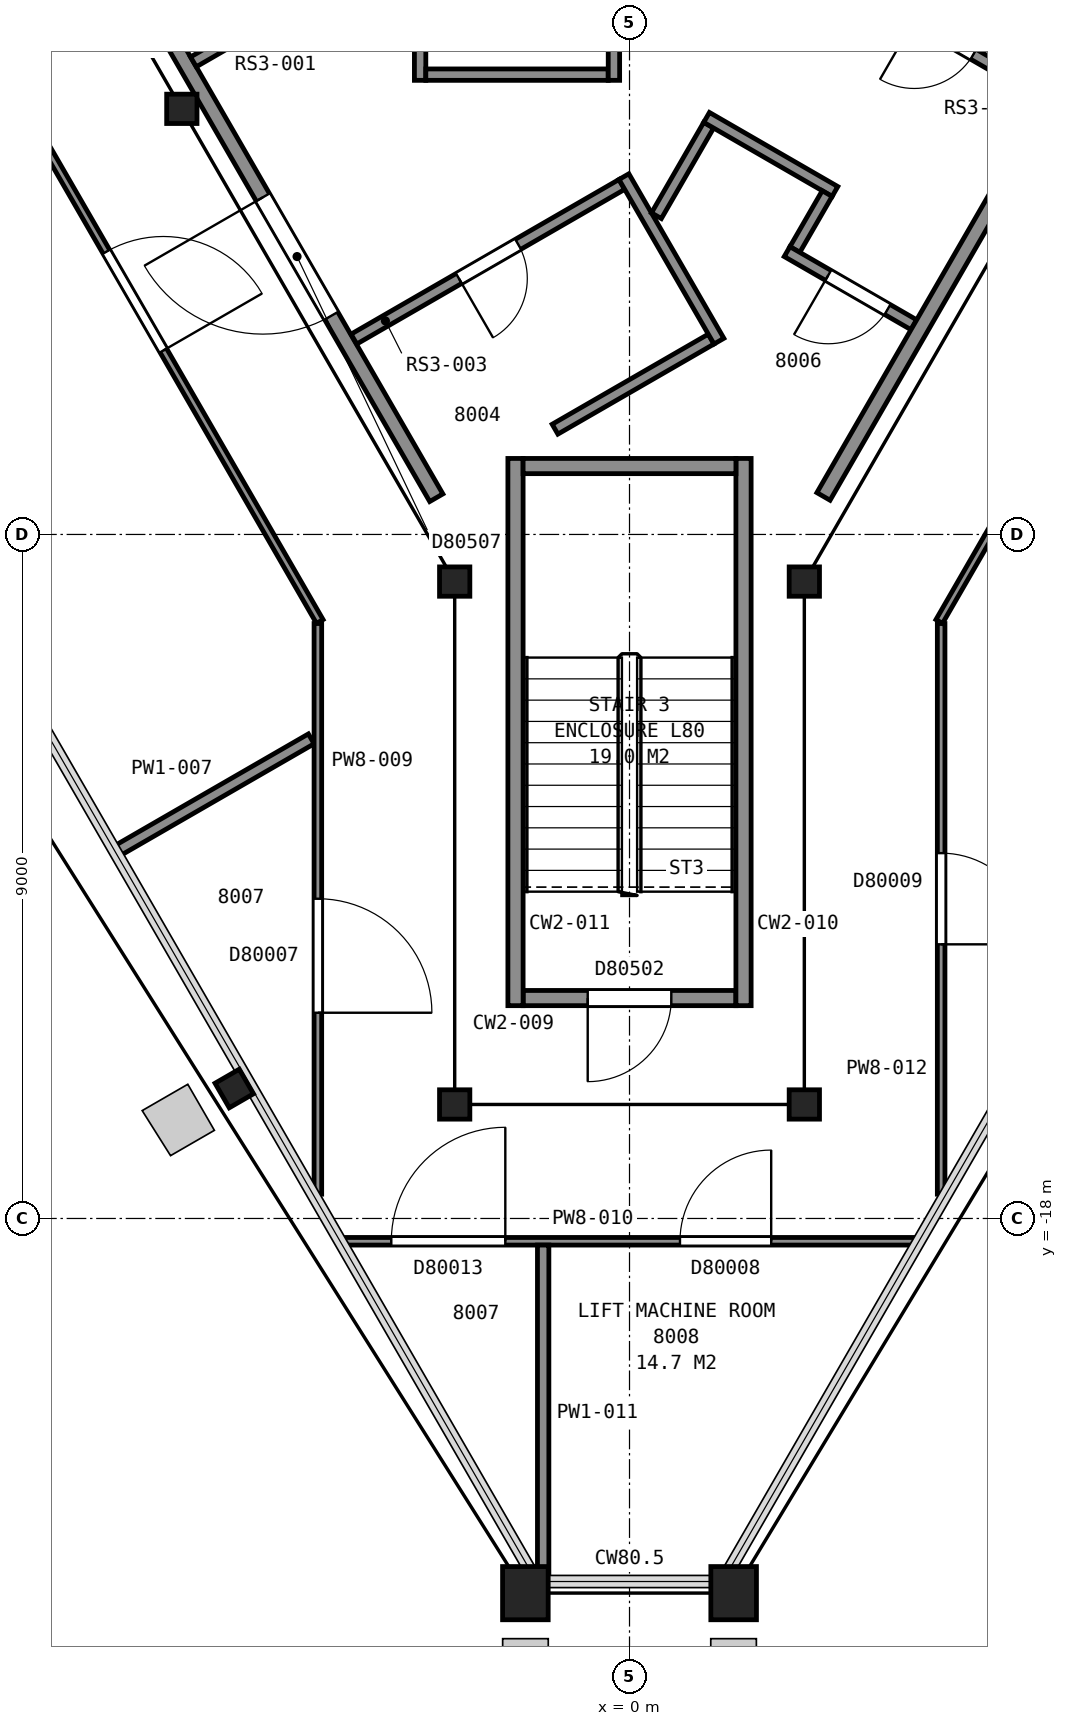
"""IFC4 building model, lengths in metres.
Left out: names, types, materials, properties, quantities, classifications, styles, units other than length and angle.
Written with IfcOpenShell. Run it as: python <this file> out.ifc"""

import sys

from ifc_helpers import new_model, si_unit, direction, frame, frame_2d, origin, origin_2d, place, context, subcontext, project, spatial, rectangle, hollow_rectangle, i_section, extrude, element, fill, save


model = new_model("IFC4")
c1 = context("Model", 3, precision=1e-05, world=origin(), true_north=direction((0.0, 1.0)))
c2 = subcontext(c1, "Body", "Model", "MODEL_VIEW")
j1 = project(units=[si_unit("LENGTHUNIT", "METRE"), si_unit("PLANEANGLEUNIT", "RADIAN")], contexts=[c1])
p1 = place(None, origin())
s1 = spatial("IfcSite", under=j1, at=p1, CompositionType="ELEMENT")
p2 = place(p1, origin())
s2 = spatial("IfcBuilding", under=s1, at=p2, CompositionType="ELEMENT")
p3 = place(p2, frame((0.0, 0.0, 316.8)))
s3 = spatial("IfcBuildingStorey", under=s2, at=p3, CompositionType="ELEMENT", Elevation=316.8)
p4 = place(p3, frame((-5.2, -16.29, 0.0), z_axis=(0.0, 0.0, 1.0), x_axis=(-0.5, 0.866025403784, 0.0)))
e1 = element("IfcColumn", 1, at=p4, inside=s3, PredefinedType="COLUMN", context=c2, shape_type="SweptSolid", body=[
    extrude(i_section(OverallWidth=0.373, OverallDepth=0.368, WebThickness=0.015, FlangeThickness=0.024, FilletRadius=0.015, at=origin_2d()), origin(), (0.0, 0.0, 1.0), 4.2),
])
for number, where, z_axis, x_axis in (
    (2, (-1.37, -22.93, 0.0), (0.0, 0.0, 1.0), (-1.0, 0.0, 0.0)),
    (3, (1.37, -22.93, 0.0), (0.0, 0.0, 1.0), (-1.0, 0.0, 0.0)),
):
    element("IfcColumn", number, at=place(p3, frame(where, z_axis=z_axis, x_axis=x_axis)), inside=s3, PredefinedType="COLUMN", context=c2, shape_type="SweptSolid", body=[
        extrude(hollow_rectangle(XDim=0.6, YDim=0.7, WallThickness=0.04, at=origin_2d()), origin(), (0.0, 0.0, 1.0), 4.2),
    ])
for number, where, z_axis, x_axis in (
    (4, (-5.89, -3.4, 0.0), (0.0, 0.0, 1.0), (1.0, 0.0, 0.0)),
    (5, (-2.3, -9.62, 0.0), (0.0, 0.0, 1.0), (1.0, 0.0, 0.0)),
    (6, (-2.3, -16.5, 0.0), (0.0, 0.0, 1.0), (-1.0, 0.0, 0.0)),
    (7, (2.3, -16.5, 0.0), (0.0, 0.0, 1.0), (-1.0, 0.0, 0.0)),
    (8, (2.3, -9.62, 0.0), (0.0, 0.0, 1.0), (1.0, 0.0, 0.0)),
):
    element("IfcColumn", number, at=place(p3, frame(where, z_axis=z_axis, x_axis=x_axis)), inside=s3, PredefinedType="COLUMN", context=c2, shape_type="SweptSolid", body=[
        extrude(i_section(OverallWidth=0.399, OverallDepth=0.386, WebThickness=0.021, FlangeThickness=0.033, FilletRadius=0.015, at=origin_2d()), origin(), (0.0, 0.0, 1.0), 4.2),
    ])
p5 = place(p3, frame((-1.4, -15.1, 0.0), z_axis=(0.0, 0.0, 1.0), x_axis=(1.0, 0.0, 0.0)))
e9 = element("IfcWall", 9, at=p5, inside=s3, PredefinedType="PARTITIONING", context=c2, shape_type="SweptSolid", body=[
    extrude(rectangle(XDim=2.8, YDim=0.2, at=frame_2d((1.4, 0.0))), origin(), (0.0, 0.0, 1.0), 3.95),
])
p6 = place(p5, frame((0.85, 0.0, 0.0)))
e10 = element("IfcOpeningElement", 10, at=p6, cuts=e9, PredefinedType="OPENING", context=c2, shape_type="SweptSolid", body=[
    extrude(rectangle(XDim=1.1, YDim=2.1, at=frame_2d((0.55, 1.05))), frame((0.0, 0.11, 0.0), z_axis=(0.0, -1.0, 0.0), x_axis=(1.0, 0.0, 0.0)), (0.0, 0.0, 1.0), 0.22),
])
for number, where, z_axis, x_axis in (
    (11, (1.5, -8.0, 0.0), (0.0, 0.0, 1.0), (0.0, -1.0, 0.0)),
    (12, (-1.5, -8.0, 0.0), (0.0, 0.0, 1.0), (0.0, -1.0, 0.0)),
):
    element("IfcWall", number, at=place(p3, frame(where, z_axis=z_axis, x_axis=x_axis)), inside=s3, PredefinedType="PARTITIONING", context=c2, shape_type="SweptSolid", body=[
        extrude(rectangle(XDim=7.2, YDim=0.2, at=frame_2d((3.6, 0.0))), origin(), (0.0, 0.0, 1.0), 3.95),
    ])
p7 = place(p3, frame((-1.4, -8.1, 0.0), z_axis=(0.0, 0.0, 1.0), x_axis=(1.0, 0.0, 0.0)))
e13 = element("IfcWall", 13, at=p7, inside=s3, PredefinedType="PARTITIONING", context=c2, shape_type="SweptSolid", body=[
    extrude(rectangle(XDim=2.8, YDim=0.2, at=frame_2d((1.4, 0.0))), origin(), (0.0, 0.0, 1.0), 3.95),
])
p8 = place(p3, frame((-7.141, -0.551, 0.0), z_axis=(0.0, 0.0, 1.0), x_axis=(0.499992795234, -0.866029563418, 0.0)))
e14 = element("IfcWall", 14, at=p8, inside=s3, PredefinedType="PARTITIONING", context=c2, shape_type="SweptSolid", body=[
    extrude(rectangle(XDim=9.198, YDim=0.2, at=frame_2d((4.599, 0.0))), origin(), (0.0, 0.0, 1.0), 3.95),
])
p9 = place(p8, frame((4.634, 0.0, 0.0)))
e15 = element("IfcOpeningElement", 15, at=p9, cuts=e14, PredefinedType="OPENING", context=c2, shape_type="SweptSolid", body=[
    extrude(rectangle(XDim=1.8, YDim=2.1, at=frame_2d((0.9, 1.05))), frame((0.0, 0.11, 0.0), z_axis=(0.0, -1.0, 0.0), x_axis=(1.0, 0.0, 0.0)), (0.0, 0.0, 1.0), 0.22),
])
p10 = place(p3, frame((-5.737, -2.782, 0.0), z_axis=(0.0, 0.0, 1.0), x_axis=(0.866000843773, 0.500042536776, 0.0)))
e16 = element("IfcWall", 16, at=p10, inside=s3, PredefinedType="PARTITIONING", context=c2, shape_type="SweptSolid", body=[
    extrude(rectangle(XDim=2.025, YDim=0.15, at=frame_2d((1.012, 0.0))), origin(), (0.0, 0.0, 1.0), 3.95),
])
p11 = place(p3, frame((-0.101, -4.395, 0.0), z_axis=(0.0, 0.0, 1.0), x_axis=(-0.866045745349, -0.499964765721, 0.0)))
e17 = element("IfcWall", 17, at=p11, inside=s3, PredefinedType="PARTITIONING", context=c2, shape_type="SweptSolid", body=[
    extrude(rectangle(XDim=4.07, YDim=0.15, at=frame_2d((2.035, 0.0))), origin(), (0.0, 0.0, 1.0), 3.95),
])
p12 = place(p11, frame((1.575, 0.0, 0.0)))
e18 = element("IfcOpeningElement", 18, at=p12, cuts=e17, PredefinedType="OPENING", context=c2, shape_type="SweptSolid", body=[
    extrude(rectangle(XDim=0.9, YDim=2.1, at=frame_2d((0.45, 1.05))), frame((0.0, 0.085, 0.0), z_axis=(0.0, -1.0, 0.0), x_axis=(1.0, 0.0, 0.0)), (0.0, 0.0, 1.0), 0.17),
])
p13 = place(p3, frame((-2.755, -0.102, 0.0), z_axis=(0.0, 0.0, 1.0), x_axis=(0.0, -1.0, 0.0)))
e19 = element("IfcWall", 19, at=p13, inside=s3, PredefinedType="PARTITIONING", context=c2, shape_type="SweptSolid", body=[
    extrude(rectangle(XDim=2.923, YDim=0.15, at=frame_2d((1.461, 0.0))), origin(), (0.0, 0.0, 1.0), 3.95),
])
p14 = place(p13, frame((0.998, 0.0, 0.0)))
e20 = element("IfcOpeningElement", 20, at=p14, cuts=e19, PredefinedType="OPENING", context=c2, shape_type="SweptSolid", body=[
    extrude(rectangle(XDim=0.9, YDim=2.1, at=frame_2d((0.45, 1.05))), frame((0.0, 0.085, 0.0), z_axis=(0.0, -1.0, 0.0), x_axis=(1.0, 0.0, 0.0)), (0.0, 0.0, 1.0), 0.17),
])
p15 = place(p3, frame((-2.68, -2.95, 0.0), z_axis=(0.0, 0.0, 1.0), x_axis=(1.0, 0.0, 0.0)))
e21 = element("IfcWall", 21, at=p15, inside=s3, PredefinedType="PARTITIONING", context=c2, shape_type="SweptSolid", body=[
    extrude(rectangle(XDim=2.4, YDim=0.15, at=frame_2d((1.2, 0.0))), origin(), (0.0, 0.0, 1.0), 3.95),
])
p16 = place(p3, frame((-0.98, -7.615, 0.0), z_axis=(0.0, 0.0, 1.0), x_axis=(0.866081021932, 0.499903654166, 0.0)))
e22 = element("IfcWall", 22, at=p16, inside=s3, PredefinedType="PARTITIONING", context=c2, shape_type="SweptSolid", body=[
    extrude(rectangle(XDim=2.372, YDim=0.15, at=frame_2d((1.186, 0.0))), origin(), (0.0, 0.0, 1.0), 3.95),
])
p17 = place(p3, frame((-0.205, -3.025, 0.0), z_axis=(0.0, 0.0, 1.0), x_axis=(0.0, 1.0, 0.0)))
e23 = element("IfcWall", 23, at=p17, inside=s3, PredefinedType="PARTITIONING", context=c2, shape_type="SweptSolid", body=[
    extrude(rectangle(XDim=2.923, YDim=0.15, at=frame_2d((1.461, 0.0))), origin(), (0.0, 0.0, 1.0), 3.95),
])
p18 = place(p3, frame((-0.073, -4.292, 0.0), z_axis=(0.0, 0.0, 1.0), x_axis=(0.500004234368, -0.866022959057, 0.0)))
e24 = element("IfcWall", 24, at=p18, inside=s3, PredefinedType="PARTITIONING", context=c2, shape_type="SweptSolid", body=[
    extrude(rectangle(XDim=2.5, YDim=0.15, at=frame_2d((1.25, 0.0))), origin(), (0.0, 0.0, 1.0), 3.95),
])
p19 = place(p3, frame((0.354, -4.806, 0.0), z_axis=(0.0, 0.0, 1.0), x_axis=(0.499804398801, 0.866138304741, 0.0)))
e25 = element("IfcWall", 25, at=p19, inside=s3, PredefinedType="PARTITIONING", context=c2, shape_type="SweptSolid", body=[
    extrude(rectangle(XDim=1.375, YDim=0.15, at=frame_2d((0.688, 0.0))), origin(), (0.0, 0.0, 1.0), 3.95),
])
p20 = place(p3, frame((1.014, -3.512, 0.0), z_axis=(0.0, 0.0, 1.0), x_axis=(0.866000020948, -0.500043961785, 0.0)))
e26 = element("IfcWall", 26, at=p20, inside=s3, PredefinedType="PARTITIONING", context=c2, shape_type="SweptSolid", body=[
    extrude(rectangle(XDim=1.95, YDim=0.15, at=frame_2d((0.975, 0.0))), origin(), (0.0, 0.0, 1.0), 3.95),
])
p21 = place(p3, frame((2.176, -5.251, 0.0), z_axis=(0.0, 0.0, 1.0), x_axis=(0.500062241894, 0.865989465428, 0.0)))
e27 = element("IfcWall", 27, at=p21, inside=s3, PredefinedType="PARTITIONING", context=c2, shape_type="SweptSolid", body=[
    extrude(rectangle(XDim=0.85, YDim=0.15, at=frame_2d((0.425, 0.0))), origin(), (0.0, 0.0, 1.0), 3.95),
])
p22 = place(p3, frame((3.74, -6.241, 0.0), z_axis=(0.0, 0.0, 1.0), x_axis=(-0.86609690551, 0.499876134923, 0.0)))
e28 = element("IfcWall", 28, at=p22, inside=s3, PredefinedType="PARTITIONING", context=c2, shape_type="SweptSolid", body=[
    extrude(rectangle(XDim=1.925, YDim=0.15, at=frame_2d((0.963, 0.0))), origin(), (0.0, 0.0, 1.0), 3.95),
])
p23 = place(p22, frame((0.4, 0.0, 0.0)))
e29 = element("IfcOpeningElement", 29, at=p23, cuts=e28, PredefinedType="OPENING", context=c2, shape_type="SweptSolid", body=[
    extrude(rectangle(XDim=0.9, YDim=2.1, at=frame_2d((0.45, 1.05))), frame((0.0, 0.085, 0.0), z_axis=(0.0, -1.0, 0.0), x_axis=(1.0, 0.0, 0.0)), (0.0, 0.0, 1.0), 0.17),
])
p24 = place(p3, frame((2.552, -8.5, 0.0), z_axis=(0.0, 0.0, 1.0), x_axis=(0.499981156672, 0.866036282712, 0.0)))
e30 = element("IfcWall", 30, at=p24, inside=s3, PredefinedType="PARTITIONING", context=c2, shape_type="SweptSolid", body=[
    extrude(rectangle(XDim=13.915, YDim=0.2, at=frame_2d((6.957, 0.0))), origin(), (0.0, 0.0, 1.0), 3.95),
])
p25 = place(p3, frame((3.551, -2.119, 0.0), z_axis=(0.0, 0.0, 1.0), x_axis=(0.865944298464, -0.500140452231, 0.0)))
e31 = element("IfcWall", 31, at=p25, inside=s3, PredefinedType="PARTITIONING", context=c2, shape_type="SweptSolid", body=[
    extrude(rectangle(XDim=2.224, YDim=0.15, at=frame_2d((1.112, 0.0))), origin(), (0.0, 0.0, 1.0), 3.95),
])
p26 = place(p25, frame((0.225, 0.0, 0.0)))
e32 = element("IfcOpeningElement", 32, at=p26, cuts=e31, PredefinedType="OPENING", context=c2, shape_type="SweptSolid", body=[
    extrude(rectangle(XDim=0.9, YDim=2.1, at=frame_2d((0.45, 1.05))), frame((0.0, 0.085, 0.0), z_axis=(0.0, -1.0, 0.0), x_axis=(1.0, 0.0, 0.0)), (0.0, 0.0, 1.0), 0.17),
])
p27 = place(p3, frame((-4.075, -10.145, 0.0), z_axis=(0.0, 0.0, 1.0), x_axis=(-0.499912942625, 0.866075660549, 0.0)))
e33 = element("IfcWall", 33, at=p27, inside=s3, PredefinedType="PARTITIONING", context=c2, shape_type="SweptSolid", body=[
    extrude(rectangle(XDim=13.499, YDim=0.1, at=frame_2d((6.749, 0.0))), origin(), (0.0, 0.0, 1.0), 3.297),
])
p28 = place(p27, frame((4.117, 0.0, 0.0)))
e34 = element("IfcOpeningElement", 34, at=p28, cuts=e33, PredefinedType="OPENING", context=c2, shape_type="SweptSolid", body=[
    extrude(rectangle(XDim=1.5, YDim=2.1, at=frame_2d((0.75, 1.05))), frame((0.0, 0.06, 0.0), z_axis=(0.0, -1.0, 0.0), x_axis=(1.0, 0.0, 0.0)), (0.0, 0.0, 1.0), 0.12),
])
p29 = place(p3, frame((-6.753, -13.17, 0.0), z_axis=(0.0, 0.0, 1.0), x_axis=(0.866125201583, 0.499827105291, 0.0)))
e35 = element("IfcWall", 35, at=p29, inside=s3, PredefinedType="PARTITIONING", context=c2, shape_type="SweptSolid", body=[
    extrude(rectangle(XDim=2.962, YDim=0.15, at=frame_2d((1.481, 0.0))), origin(), (0.0, 0.0, 1.0), 3.297),
])
p30 = place(p3, frame((-4.1, -17.68, 0.0), z_axis=(0.0, 0.0, 1.0), x_axis=(0.0, 1.0, 0.0)))
e36 = element("IfcWall", 36, at=p30, inside=s3, PredefinedType="PARTITIONING", context=c2, shape_type="SweptSolid", body=[
    extrude(rectangle(XDim=7.508, YDim=0.1, at=frame_2d((3.754, 0.0))), origin(), (0.0, 0.0, 1.0), 3.297),
])
p31 = place(p30, frame((2.387, 0.0, 0.0)))
e37 = element("IfcOpeningElement", 37, at=p31, cuts=e36, PredefinedType="OPENING", context=c2, shape_type="SweptSolid", body=[
    extrude(rectangle(XDim=1.5, YDim=2.1, at=frame_2d((0.75, 1.05))), frame((0.0, 0.06, 0.0), z_axis=(0.0, -1.0, 0.0), x_axis=(1.0, 0.0, 0.0)), (0.0, 0.0, 1.0), 0.12),
])
p32 = place(p3, frame((3.763, -18.3, 0.0), z_axis=(0.0, 0.0, 1.0), x_axis=(-1.0, 0.0, 0.0)))
e38 = element("IfcWall", 38, at=p32, inside=s3, PredefinedType="PARTITIONING", context=c2, shape_type="SweptSolid", body=[
    extrude(rectangle(XDim=7.526, YDim=0.1, at=frame_2d((3.763, 0.0))), origin(), (0.0, 0.0, 1.0), 3.297),
])
p33 = place(p32, frame((1.899, 0.0, 0.0)))
e39 = element("IfcOpeningElement", 39, at=p33, cuts=e38, PredefinedType="OPENING", context=c2, shape_type="SweptSolid", body=[
    extrude(rectangle(XDim=1.2, YDim=2.1, at=frame_2d((0.6, 1.05))), frame((0.0, 0.06, 0.0), z_axis=(0.0, -1.0, 0.0), x_axis=(1.0, 0.0, 0.0)), (0.0, 0.0, 1.0), 0.12),
])
p34 = place(p32, frame((5.397, 0.0, 0.0)))
e40 = element("IfcOpeningElement", 40, at=p34, cuts=e38, PredefinedType="OPENING", context=c2, shape_type="SweptSolid", body=[
    extrude(rectangle(XDim=1.5, YDim=2.1, at=frame_2d((0.75, 1.05))), frame((0.0, 0.06, 0.0), z_axis=(0.0, -1.0, 0.0), x_axis=(1.0, 0.0, 0.0)), (0.0, 0.0, 1.0), 0.12),
])
p35 = place(p3, frame((-1.136, -22.764, 0.0), z_axis=(0.0, 0.0, 1.0), x_axis=(0.0, 1.0, 0.0)))
e41 = element("IfcWall", 41, at=p35, inside=s3, PredefinedType="PARTITIONING", context=c2, shape_type="SweptSolid", body=[
    extrude(rectangle(XDim=4.414, YDim=0.15, at=frame_2d((2.207, 0.0))), origin(), (0.0, 0.0, 1.0), 3.297),
])
p36 = place(p3, frame((4.1, -10.172, 0.0), z_axis=(0.0, 0.0, 1.0), x_axis=(0.0, -1.0, 0.0)))
e42 = element("IfcWall", 42, at=p36, inside=s3, PredefinedType="PARTITIONING", context=c2, shape_type="SweptSolid", body=[
    extrude(rectangle(XDim=7.508, YDim=0.1, at=frame_2d((3.754, 0.0))), origin(), (0.0, 0.0, 1.0), 3.297),
])
p37 = place(p36, frame((3.021, 0.0, 0.0)))
e43 = element("IfcOpeningElement", 43, at=p37, cuts=e42, PredefinedType="OPENING", context=c2, shape_type="SweptSolid", body=[
    extrude(rectangle(XDim=1.2, YDim=2.1, at=frame_2d((0.6, 1.05))), frame((0.0, 0.06, 0.0), z_axis=(0.0, -1.0, 0.0), x_axis=(1.0, 0.0, 0.0)), (0.0, 0.0, 1.0), 0.12),
])
p38 = place(p3, frame((4.075, -10.145, 0.0), z_axis=(0.0, 0.0, 1.0), x_axis=(0.499912942625, 0.866075660549, 0.0)))
e44 = element("IfcWall", 44, at=p38, inside=s3, PredefinedType="PARTITIONING", context=c2, shape_type="SweptSolid", body=[
    extrude(rectangle(XDim=13.499, YDim=0.1, at=frame_2d((6.749, 0.0))), origin(), (0.0, 0.0, 1.0), 3.297),
])
p39 = place(p6, origin())
e45 = element("IfcDoor", 45, at=p39, inside=s3, OperationType="SINGLE_SWING_LEFT", PredefinedType="DOOR", context=c2, shape_type="SweptSolid", body=[
    extrude(rectangle(XDim=1.1, YDim=2.1, at=frame_2d((0.55, 1.05))), frame((0.0, 0.025, 0.0), z_axis=(0.0, -1.0, 0.0), x_axis=(1.0, 0.0, 0.0)), (0.0, 0.0, 1.0), 0.05),
])
fill(e10, e45)
p40 = place(p9, origin())
e46 = element("IfcDoor", 46, at=p40, inside=s3, OperationType="DOUBLE_DOOR_SINGLE_SWING", PredefinedType="DOOR", context=c2, shape_type="SweptSolid", body=[
    extrude(rectangle(XDim=1.8, YDim=2.1, at=frame_2d((0.9, 1.05))), frame((0.0, 0.025, 0.0), z_axis=(0.0, -1.0, 0.0), x_axis=(1.0, 0.0, 0.0)), (0.0, 0.0, 1.0), 0.05),
])
fill(e15, e46)
p41 = place(p12, origin())
e47 = element("IfcDoor", 47, at=p41, inside=s3, OperationType="SINGLE_SWING_RIGHT", PredefinedType="DOOR", context=c2, shape_type="SweptSolid", body=[
    extrude(rectangle(XDim=0.9, YDim=2.1, at=frame_2d((0.45, 1.05))), frame((0.0, 0.025, 0.0), z_axis=(0.0, -1.0, 0.0), x_axis=(1.0, 0.0, 0.0)), (0.0, 0.0, 1.0), 0.05),
])
fill(e18, e47)
p42 = place(p23, origin())
e48 = element("IfcDoor", 48, at=p42, inside=s3, OperationType="SINGLE_SWING_RIGHT", PredefinedType="DOOR", context=c2, shape_type="SweptSolid", body=[
    extrude(rectangle(XDim=0.9, YDim=2.1, at=frame_2d((0.45, 1.05))), frame((0.0, 0.025, 0.0), z_axis=(0.0, -1.0, 0.0), x_axis=(1.0, 0.0, 0.0)), (0.0, 0.0, 1.0), 0.05),
])
fill(e29, e48)
p43 = place(p26, origin())
e49 = element("IfcDoor", 49, at=p43, inside=s3, OperationType="SINGLE_SWING_LEFT", PredefinedType="DOOR", context=c2, shape_type="SweptSolid", body=[
    extrude(rectangle(XDim=0.9, YDim=2.1, at=frame_2d((0.45, 1.05))), frame((0.0, 0.025, 0.0), z_axis=(0.0, -1.0, 0.0), x_axis=(1.0, 0.0, 0.0)), (0.0, 0.0, 1.0), 0.05),
])
fill(e32, e49)
p44 = place(p28, origin())
e50 = element("IfcDoor", 50, at=p44, inside=s3, OperationType="DOUBLE_DOOR_SINGLE_SWING", PredefinedType="DOOR", context=c2, shape_type="SweptSolid", body=[
    extrude(rectangle(XDim=1.5, YDim=2.1, at=frame_2d((0.75, 1.05))), frame((0.0, 0.025, 0.0), z_axis=(0.0, -1.0, 0.0), x_axis=(1.0, 0.0, 0.0)), (0.0, 0.0, 1.0), 0.05),
])
fill(e34, e50)
p45 = place(p31, origin())
e51 = element("IfcDoor", 51, at=p45, inside=s3, OperationType="DOUBLE_DOOR_SINGLE_SWING", PredefinedType="DOOR", context=c2, shape_type="SweptSolid", body=[
    extrude(rectangle(XDim=1.5, YDim=2.1, at=frame_2d((0.75, 1.05))), frame((0.0, 0.025, 0.0), z_axis=(0.0, -1.0, 0.0), x_axis=(1.0, 0.0, 0.0)), (0.0, 0.0, 1.0), 0.05),
])
fill(e37, e51)
p46 = place(p33, origin())
e52 = element("IfcDoor", 52, at=p46, inside=s3, OperationType="SINGLE_SWING_LEFT", PredefinedType="DOOR", context=c2, shape_type="SweptSolid", body=[
    extrude(rectangle(XDim=1.2, YDim=2.1, at=frame_2d((0.6, 1.05))), frame((0.0, 0.025, 0.0), z_axis=(0.0, -1.0, 0.0), x_axis=(1.0, 0.0, 0.0)), (0.0, 0.0, 1.0), 0.05),
])
fill(e39, e52)
p47 = place(p34, origin())
e53 = element("IfcDoor", 53, at=p47, inside=s3, OperationType="DOUBLE_DOOR_SINGLE_SWING", PredefinedType="DOOR", context=c2, shape_type="SweptSolid", body=[
    extrude(rectangle(XDim=1.5, YDim=2.1, at=frame_2d((0.75, 1.05))), frame((0.0, 0.025, 0.0), z_axis=(0.0, -1.0, 0.0), x_axis=(1.0, 0.0, 0.0)), (0.0, 0.0, 1.0), 0.05),
])
fill(e40, e53)
p48 = place(p37, origin())
e54 = element("IfcDoor", 54, at=p48, inside=s3, OperationType="SINGLE_SWING_RIGHT", PredefinedType="DOOR", context=c2, shape_type="SweptSolid", body=[
    extrude(rectangle(XDim=1.2, YDim=2.1, at=frame_2d((0.6, 1.05))), frame((0.0, 0.025, 0.0), z_axis=(0.0, -1.0, 0.0), x_axis=(1.0, 0.0, 0.0)), (0.0, 0.0, 1.0), 0.05),
])
fill(e43, e54)
save(model, sys.argv[1])
